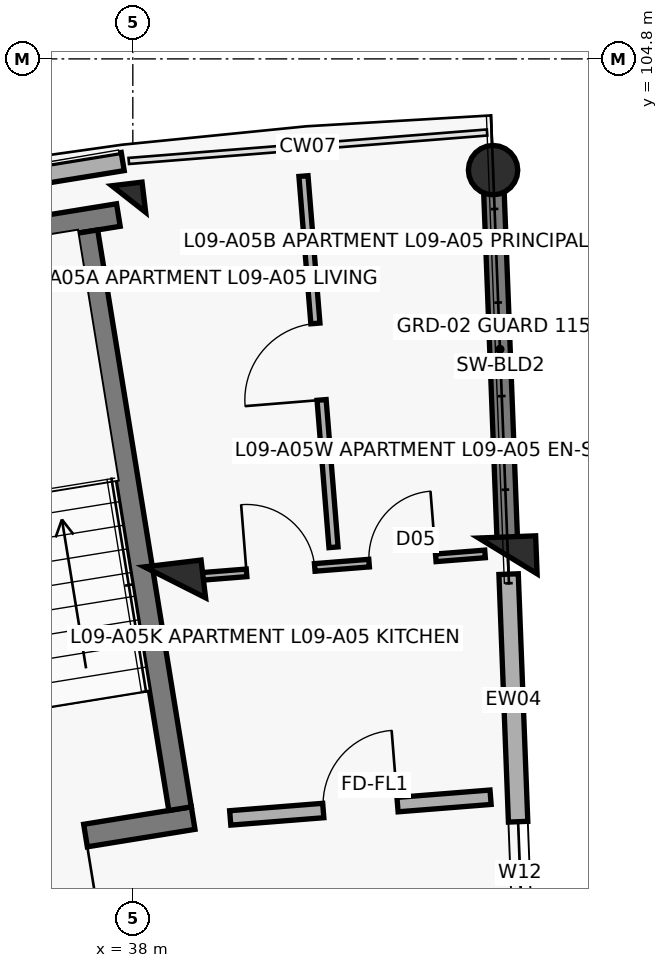
"""IFC4 building model, lengths in metres.
Left out: names, types, materials, properties, quantities, classifications, styles, units other than length and angle.
Written with IfcOpenShell. Run it as: python <this file> out.ifc"""

import sys

from ifc_helpers import new_model, si_unit, direction, frame, frame_2d, origin, origin_2d, place, context, subcontext, project, spatial, rectangle, circle, extrude, element, fill, save


model = new_model("IFC4")
c1 = context("Model", 3, precision=1e-05, world=origin(), true_north=direction((0.0, 1.0)))
c2 = subcontext(c1, "Body", "Model", "MODEL_VIEW")
j1 = project(units=[si_unit("LENGTHUNIT", "METRE"), si_unit("PLANEANGLEUNIT", "RADIAN")], contexts=[c1])
p1 = place(None, origin())
s1 = spatial("IfcSite", under=j1, at=p1, CompositionType="ELEMENT")
p2 = place(p1, origin())
s2 = spatial("IfcBuilding", under=s1, at=p2, CompositionType="ELEMENT")
p3 = place(p2, frame((0.0, 0.0, 29.8)))
s3 = spatial("IfcBuildingStorey", under=s2, at=p3, CompositionType="ELEMENT", Elevation=29.8)
p4 = place(p3, frame((38.555, 97.913, 0.0), z_axis=(0.0, 0.0, 1.0), x_axis=(-0.119790293837, 0.992799217114, 0.0)))
e1 = element("IfcColumn", 1, at=p4, inside=s3, PredefinedType="COLUMN", context=c2, shape_type="SweptSolid", body=[
    extrude(rectangle(XDim=0.5, YDim=0.75, at=origin_2d()), origin(), (0.0, 0.0, 1.0), 3.1),
])
p5 = place(p3, frame((37.947, 102.956, 0.0), z_axis=(0.0, 0.0, 1.0), x_axis=(-0.119790293837, 0.992799217114, 0.0)))
e2 = element("IfcColumn", 2, at=p5, inside=s3, PredefinedType="COLUMN", context=c2, shape_type="SweptSolid", body=[
    extrude(rectangle(XDim=0.4, YDim=0.4, at=origin_2d()), origin(), (0.0, 0.0, 1.0), 3.1),
])
p6 = place(p3, frame((42.935, 98.26, 0.0), z_axis=(0.0, 0.0, 1.0), x_axis=(-0.038387809088, 0.999262916411, 0.0)))
e3 = element("IfcColumn", 3, at=p6, inside=s3, PredefinedType="COLUMN", context=c2, shape_type="SweptSolid", body=[
    extrude(rectangle(XDim=0.5, YDim=0.75, at=origin_2d()), origin(), (0.0, 0.0, 1.0), 3.1),
])
p7 = place(p3, frame((42.74, 103.337, 0.0), z_axis=(0.0, 0.0, 1.0), x_axis=(-0.038387809088, 0.999262916411, 0.0)))
e4 = element("IfcColumn", 4, at=p7, inside=s3, PredefinedType="COLUMN", context=c2, shape_type="SweptSolid", body=[
    extrude(circle(Radius=0.325, at=origin_2d()), origin(), (0.0, 0.0, 1.0), 3.1),
])
p8 = place(p3, frame((42.928, 98.44, 0.0), z_axis=(0.0, 0.0, 1.0), x_axis=(-0.038379487611, 0.999263236055, 0.0)))
e5 = element("IfcWall", 5, at=p8, inside=s3, PredefinedType="SHEAR", context=c2, shape_type="SweptSolid", body=[
    extrude(rectangle(XDim=4.72, YDim=0.27, at=frame_2d((2.36, 0.0))), origin(), (0.0, 0.0, 1.0), 2.86),
])
p9 = place(p3, frame((33.12, 102.679, 0.0), z_axis=(0.0, 0.0, 1.0), x_axis=(0.987080750493, 0.160223568819, 0.0)))
e6 = element("IfcWall", 6, at=p9, inside=s3, PredefinedType="SOLIDWALL", context=c2, shape_type="SweptSolid", body=[
    extrude(rectangle(XDim=4.809, YDim=0.242, at=frame_2d((2.404, 0.0))), origin(), (0.0, 0.0, 1.0), 2.25),
])
p10 = place(p3, frame((43.259, 89.827, 0.0), z_axis=(0.0, 0.0, 1.0), x_axis=(-0.038407966241, 0.999262141847, 0.0)))
e7 = element("IfcWall", 7, at=p10, inside=s3, PredefinedType="SOLIDWALL", context=c2, shape_type="SweptSolid", body=[
    extrude(rectangle(XDim=8.2, YDim=0.255, at=frame_2d((4.1, 0.0))), origin(), (0.0, 0.0, 1.0), 2.18),
])
p11 = place(p10, frame((3.59, 0.0, 0.75)))
e8 = element("IfcOpeningElement", 8, at=p11, cuts=e7, PredefinedType="OPENING", context=c2, shape_type="SweptSolid", body=[
    extrude(rectangle(XDim=1.35, YDim=1.35, at=frame_2d((0.675, 0.675))), frame((0.0, 0.137, 0.0), z_axis=(0.0, -1.0, 0.0), x_axis=(1.0, 0.0, 0.0)), (0.0, 0.0, 1.0), 0.275),
])
p12 = place(p3, frame((38.794, 94.811, 0.0), z_axis=(0.0, 0.0, 1.0), x_axis=(-0.987077443397, -0.160243941341, 0.0)))
e9 = element("IfcWall", 9, at=p12, inside=s3, PredefinedType="SHEAR", context=c2, shape_type="SweptSolid", body=[
    extrude(rectangle(XDim=3.87, YDim=0.3, at=frame_2d((1.935, 0.0))), origin(), (0.0, 0.0, 1.0), 3.1),
])
p13 = place(p12, frame((1.435, 0.0, 0.0)))
e10 = element("IfcOpeningElement", 10, at=p13, cuts=e9, PredefinedType="OPENING", context=c2, shape_type="SweptSolid", body=[
    extrude(rectangle(XDim=1.0, YDim=2.15, at=frame_2d((0.5, 1.075))), frame((0.0, 0.16, 0.0), z_axis=(0.0, -1.0, 0.0), x_axis=(1.0, 0.0, 0.0)), (0.0, 0.0, 1.0), 0.32),
])
p14 = place(p3, frame((37.81, 102.745, 0.0), z_axis=(0.0, 0.0, 1.0), x_axis=(-0.987084710126, -0.160199173019, 0.0)))
e11 = element("IfcWall", 11, at=p14, inside=s3, PredefinedType="SHEAR", context=c2, shape_type="SweptSolid", body=[
    extrude(rectangle(XDim=4.47, YDim=0.3, at=frame_2d((2.235, 0.0))), origin(), (0.0, 0.0, 1.0), 3.1),
])
p15 = place(p3, frame((38.622, 94.935, 0.0), z_axis=(0.0, 0.0, 1.0), x_axis=(-0.160196564502, 0.987085133472, 0.0)))
e12 = element("IfcWall", 12, at=p15, inside=s3, PredefinedType="SHEAR", context=c2, shape_type="SweptSolid", body=[
    extrude(rectangle(XDim=7.69, YDim=0.3, at=frame_2d((3.845, 0.0))), origin(), (0.0, 0.0, 1.0), 3.1),
])
p16 = place(p3, frame((39.281, 94.813, 0.0), z_axis=(0.0, 0.0, 1.0), x_axis=(0.996862545573, 0.079152165058, 0.0)))
e13 = element("IfcWall", 13, at=p16, inside=s3, PredefinedType="SOLIDWALL", context=c2, shape_type="SweptSolid", body=[
    extrude(rectangle(XDim=3.436, YDim=0.19, at=frame_2d((1.718, 0.0))), origin(), (0.0, 0.0, 1.0), 2.08),
])
p17 = place(p16, frame((1.228, 0.0, 0.0)))
e14 = element("IfcOpeningElement", 14, at=p17, cuts=e13, PredefinedType="OPENING", context=c2, shape_type="SweptSolid", body=[
    extrude(rectangle(XDim=0.98, YDim=2.15, at=frame_2d((0.49, 1.075))), frame((0.0, 0.105, 0.0), z_axis=(0.0, -1.0, 0.0), x_axis=(1.0, 0.0, 0.0)), (0.0, 0.0, 1.0), 0.21),
])
p18 = place(p3, frame((38.848, 97.986, 0.0), z_axis=(0.0, 0.0, 1.0), x_axis=(0.996863138536, 0.079144696778, 0.0)))
e15 = element("IfcWall", 15, at=p18, inside=s3, PredefinedType="PARTITIONING", context=c2, shape_type="SweptSolid", body=[
    extrude(rectangle(XDim=3.797, YDim=0.1, at=frame_2d((1.899, 0.0))), origin(), (0.0, 0.0, 1.0), 2.08),
])
p19 = place(p18, frame((0.65, 0.0, 0.0)))
e16 = element("IfcOpeningElement", 16, at=p19, cuts=e15, PredefinedType="OPENING", context=c2, shape_type="SweptSolid", body=[
    extrude(rectangle(XDim=0.9, YDim=2.1, at=frame_2d((0.45, 1.05))), frame((0.0, 0.06, 0.0), z_axis=(0.0, -1.0, 0.0), x_axis=(1.0, 0.0, 0.0)), (0.0, 0.0, 1.0), 0.12),
])
p20 = place(p18, frame((2.267, 0.0, 0.0)))
e17 = element("IfcOpeningElement", 17, at=p20, cuts=e15, PredefinedType="OPENING", context=c2, shape_type="SweptSolid", body=[
    extrude(rectangle(XDim=0.88, YDim=2.1, at=frame_2d((0.44, 1.05))), frame((0.0, 0.06, 0.0), z_axis=(0.0, -1.0, 0.0), x_axis=(1.0, 0.0, 0.0)), (0.0, 0.0, 1.0), 0.12),
])
p21 = place(p3, frame((40.64, 98.374, 0.0), z_axis=(0.0, 0.0, 1.0), x_axis=(-0.080666032472, 0.996741185667, 0.0)))
e18 = element("IfcWall", 18, at=p21, inside=s3, PredefinedType="PARTITIONING", context=c2, shape_type="SweptSolid", body=[
    extrude(rectangle(XDim=4.9, YDim=0.12, at=frame_2d((2.45, 0.0))), origin(), (0.0, 0.0, 1.0), 2.08),
])
p22 = place(p21, frame((1.945, 0.0, 0.0)))
e19 = element("IfcOpeningElement", 19, at=p22, cuts=e18, PredefinedType="OPENING", context=c2, shape_type="SweptSolid", body=[
    extrude(rectangle(XDim=1.01, YDim=2.1, at=frame_2d((0.505, 1.05))), frame((0.0, 0.07, 0.0), z_axis=(0.0, -1.0, 0.0), x_axis=(1.0, 0.0, 0.0)), (0.0, 0.0, 1.0), 0.14),
])
p23 = place(p11, origin())
e20 = element("IfcWindow", 20, at=p23, inside=s3, PartitioningType="DOUBLE_PANEL_VERTICAL", PredefinedType="WINDOW", context=c2, shape_type="SweptSolid", body=[
    extrude(rectangle(XDim=1.35, YDim=1.35, at=frame_2d((0.675, 0.675))), frame((0.0, 0.03, 0.0), z_axis=(0.0, -1.0, 0.0), x_axis=(1.0, 0.0, 0.0)), (0.0, 0.0, 1.0), 0.06),
])
fill(e8, e20)
p24 = place(p13, origin())
e21 = element("IfcDoor", 21, at=p24, inside=s3, OperationType="SINGLE_SWING_LEFT", PredefinedType="DOOR", context=c2, shape_type="SweptSolid", body=[
    extrude(rectangle(XDim=1.0, YDim=2.15, at=frame_2d((0.5, 1.075))), frame((0.0, 0.025, 0.0), z_axis=(0.0, -1.0, 0.0), x_axis=(1.0, 0.0, 0.0)), (0.0, 0.0, 1.0), 0.05),
])
fill(e10, e21)
p25 = place(p17, origin())
e22 = element("IfcDoor", 22, at=p25, inside=s3, OperationType="SINGLE_SWING_RIGHT", PredefinedType="DOOR", context=c2, shape_type="SweptSolid", body=[
    extrude(rectangle(XDim=0.98, YDim=2.15, at=frame_2d((0.49, 1.075))), frame((0.0, 0.025, 0.0), z_axis=(0.0, -1.0, 0.0), x_axis=(1.0, 0.0, 0.0)), (0.0, 0.0, 1.0), 0.05),
])
fill(e14, e22)
p26 = place(p19, origin())
e23 = element("IfcDoor", 23, at=p26, inside=s3, OperationType="SINGLE_SWING_LEFT", PredefinedType="DOOR", context=c2, shape_type="SweptSolid", body=[
    extrude(rectangle(XDim=0.9, YDim=2.1, at=frame_2d((0.45, 1.05))), frame((0.0, 0.025, 0.0), z_axis=(0.0, -1.0, 0.0), x_axis=(1.0, 0.0, 0.0)), (0.0, 0.0, 1.0), 0.05),
])
fill(e16, e23)
p27 = place(p20, origin())
e24 = element("IfcDoor", 24, at=p27, inside=s3, OperationType="SINGLE_SWING_RIGHT", PredefinedType="DOOR", context=c2, shape_type="SweptSolid", body=[
    extrude(rectangle(XDim=0.88, YDim=2.1, at=frame_2d((0.44, 1.05))), frame((0.0, 0.025, 0.0), z_axis=(0.0, -1.0, 0.0), x_axis=(1.0, 0.0, 0.0)), (0.0, 0.0, 1.0), 0.05),
])
fill(e17, e24)
p28 = place(p22, origin())
e25 = element("IfcDoor", 25, at=p28, inside=s3, OperationType="SINGLE_SWING_LEFT", PredefinedType="DOOR", context=c2, shape_type="SweptSolid", body=[
    extrude(rectangle(XDim=1.01, YDim=2.1, at=frame_2d((0.505, 1.05))), frame((0.0, 0.025, 0.0), z_axis=(0.0, -1.0, 0.0), x_axis=(1.0, 0.0, 0.0)), (0.0, 0.0, 1.0), 0.05),
])
fill(e19, e25)
save(model, sys.argv[1])
